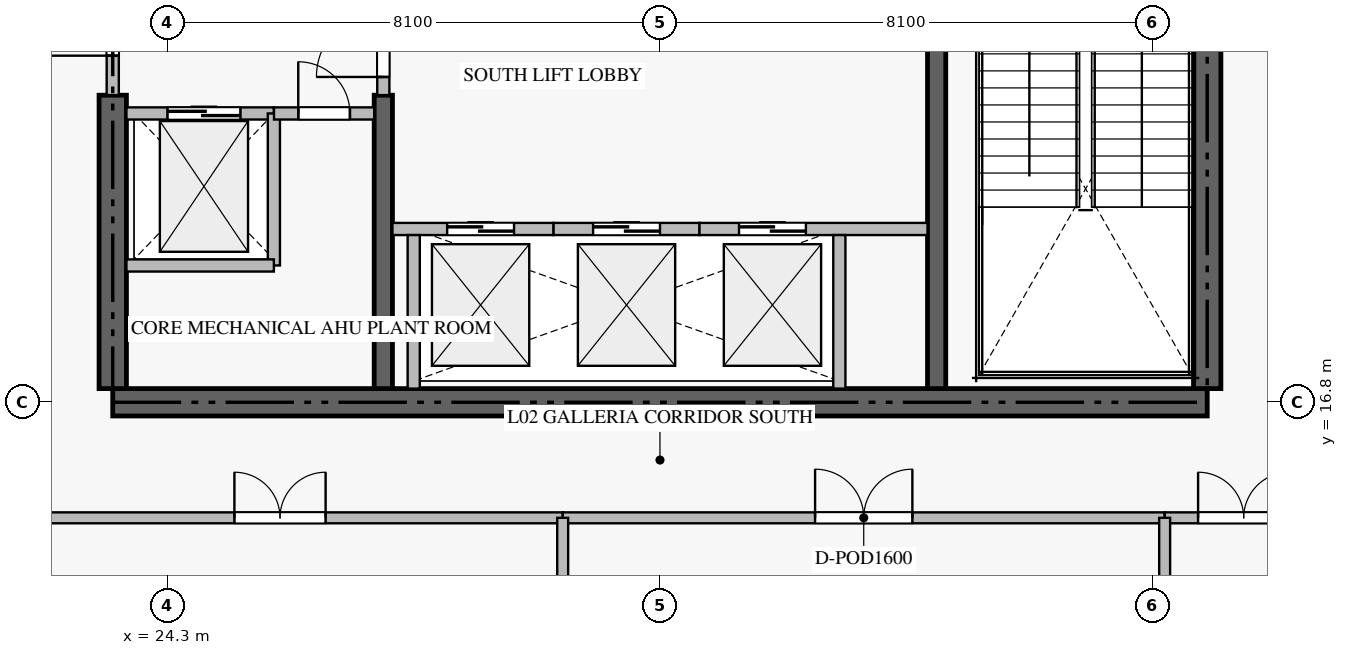
"""IFC4 building model, lengths in metres.
Left out: names, types, materials, properties, quantities, classifications, styles, units other than length and angle.
Written with IfcOpenShell. Run it as: python <this file> out.ifc"""

import sys

from ifc_helpers import new_model, si_unit, direction, frame, frame_2d, origin, place, context, subcontext, project, spatial, rectangle, extrude, source, transform, mapped, element, fill, save


model = new_model("IFC4")
c1 = context("Model", 3, precision=1e-05, world=origin(), true_north=direction((0.0, 1.0)))
c2 = subcontext(c1, "Body", "Model", "MODEL_VIEW")
j1 = project(units=[si_unit("LENGTHUNIT", "METRE"), si_unit("PLANEANGLEUNIT", "RADIAN")], contexts=[c1])
p1 = place(None, origin())
s1 = spatial("IfcSite", under=j1, at=p1, CompositionType="ELEMENT")
p2 = place(p1, origin())
s2 = spatial("IfcBuilding", under=s1, at=p2, CompositionType="ELEMENT")
p3 = place(p2, frame((0.0, 0.0, 10.5)))
s3 = spatial("IfcBuildingStorey", under=s2, at=p3, CompositionType="ELEMENT", Elevation=10.5)
p4 = place(p3, frame((23.4, 16.8, -0.38), z_axis=(0.0, 0.0, 1.0), x_axis=(1.0, 0.0, 0.0)))
e1 = element("IfcWall", 1, at=p4, inside=s3, PredefinedType="SHEAR", context=c2, shape_type="SweptSolid", body=[
    extrude(rectangle(XDim=18.0, YDim=0.45, at=frame_2d((9.0, 0.0))), origin(), (0.0, 0.0, 1.0), 4.798),
])
p5 = place(p3, frame((23.4, 17.025, -0.38), z_axis=(0.0, 0.0, 1.0), x_axis=(0.0, 1.0, 0.0)))
e2 = element("IfcWall", 2, at=p5, inside=s3, PredefinedType="SHEAR", context=c2, shape_type="SweptSolid", body=[
    extrude(rectangle(XDim=4.825, YDim=0.45, at=frame_2d((2.413, 0.0))), origin(), (0.0, 0.0, 1.0), 4.798),
])
p6 = place(p3, frame((41.4, 17.025, -0.38), z_axis=(0.0, 0.0, 1.0), x_axis=(0.0, 1.0, 0.0)))
e3 = element("IfcWall", 3, at=p6, inside=s3, PredefinedType="SHEAR", context=c2, shape_type="SweptSolid", body=[
    extrude(rectangle(XDim=8.325, YDim=0.45, at=frame_2d((4.163, 0.0))), origin(), (0.0, 0.0, 1.0), 4.798),
])
p7 = place(p3, frame((27.85, 17.025, -0.38), z_axis=(0.0, 0.0, 1.0), x_axis=(0.0, 1.0, 0.0)))
e4 = element("IfcWall", 4, at=p7, inside=s3, PredefinedType="SHEAR", context=c2, shape_type="SweptSolid", body=[
    extrude(rectangle(XDim=4.825, YDim=0.3, at=frame_2d((2.413, 0.0))), origin(), (0.0, 0.0, 1.0), 4.798),
])
p8 = place(p3, frame((36.95, 17.025, -0.38), z_axis=(0.0, 0.0, 1.0), x_axis=(0.0, 1.0, 0.0)))
e5 = element("IfcWall", 5, at=p8, inside=s3, PredefinedType="SHEAR", context=c2, shape_type="SweptSolid", body=[
    extrude(rectangle(XDim=8.325, YDim=0.3, at=frame_2d((4.163, 0.0))), origin(), (0.0, 0.0, 1.0), 4.798),
])
p9 = place(p3, frame((23.625, 21.55, 0.0), z_axis=(0.0, 0.0, 1.0), x_axis=(1.0, 0.0, 0.0)))
e6 = element("IfcWall", 6, at=p9, inside=s3, PredefinedType="STANDARD", context=c2, shape_type="SweptSolid", body=[
    extrude(rectangle(XDim=2.425, YDim=0.2, at=frame_2d((1.212, 0.0))), origin(), (0.0, 0.0, 1.0), 4.42),
])
p10 = place(p9, frame((0.675, 0.0, 0.0)))
e7 = element("IfcOpeningElement", 7, at=p10, cuts=e6, PredefinedType="OPENING", context=c2, shape_type="SweptSolid", body=[
    extrude(rectangle(XDim=1.2, YDim=2.2, at=frame_2d((0.6, 1.1))), frame((0.0, 0.11, 0.0), z_axis=(0.0, -1.0, 0.0), x_axis=(1.0, 0.0, 0.0)), (0.0, 0.0, 1.0), 0.22),
])
p11 = place(p3, frame((28.0, 19.65, 0.0), z_axis=(0.0, 0.0, 1.0), x_axis=(1.0, 0.0, 0.0)))
e8 = element("IfcWall", 8, at=p11, inside=s3, PredefinedType="STANDARD", context=c2, shape_type="SweptSolid", body=[
    extrude(rectangle(XDim=2.65, YDim=0.2, at=frame_2d((1.325, 0.0))), origin(), (0.0, 0.0, 1.0), 4.42),
])
p12 = place(p11, frame((0.9, 0.0, 0.0)))
e9 = element("IfcOpeningElement", 9, at=p12, cuts=e8, PredefinedType="OPENING", context=c2, shape_type="SweptSolid", body=[
    extrude(rectangle(XDim=1.1, YDim=2.2, at=frame_2d((0.55, 1.1))), frame((0.0, 0.11, 0.0), z_axis=(0.0, -1.0, 0.0), x_axis=(1.0, 0.0, 0.0)), (0.0, 0.0, 1.0), 0.22),
])
p13 = place(p3, frame((28.35, 17.025, 0.0), z_axis=(0.0, 0.0, 1.0), x_axis=(0.0, 1.0, 0.0)))
e10 = element("IfcWall", 10, at=p13, inside=s3, PredefinedType="STANDARD", context=c2, shape_type="SweptSolid", body=[
    extrude(rectangle(XDim=2.525, YDim=0.2, at=frame_2d((1.263, 0.0))), origin(), (0.0, 0.0, 1.0), 4.42),
])
p14 = place(p3, frame((30.65, 19.65, 0.0), z_axis=(0.0, 0.0, 1.0), x_axis=(1.0, 0.0, 0.0)))
e11 = element("IfcWall", 11, at=p14, inside=s3, PredefinedType="STANDARD", context=c2, shape_type="SweptSolid", body=[
    extrude(rectangle(XDim=2.4, YDim=0.2, at=frame_2d((1.2, 0.0))), origin(), (0.0, 0.0, 1.0), 4.42),
])
p15 = place(p14, frame((0.65, 0.0, 0.0)))
e12 = element("IfcOpeningElement", 12, at=p15, cuts=e11, PredefinedType="OPENING", context=c2, shape_type="SweptSolid", body=[
    extrude(rectangle(XDim=1.1, YDim=2.2, at=frame_2d((0.55, 1.1))), frame((0.0, 0.11, 0.0), z_axis=(0.0, -1.0, 0.0), x_axis=(1.0, 0.0, 0.0)), (0.0, 0.0, 1.0), 0.22),
])
p16 = place(p3, frame((33.05, 19.65, 0.0), z_axis=(0.0, 0.0, 1.0), x_axis=(1.0, 0.0, 0.0)))
e13 = element("IfcWall", 13, at=p16, inside=s3, PredefinedType="STANDARD", context=c2, shape_type="SweptSolid", body=[
    extrude(rectangle(XDim=3.75, YDim=0.2, at=frame_2d((1.875, 0.0))), origin(), (0.0, 0.0, 1.0), 4.42),
])
p17 = place(p16, frame((0.65, 0.0, 0.0)))
e14 = element("IfcOpeningElement", 14, at=p17, cuts=e13, PredefinedType="OPENING", context=c2, shape_type="SweptSolid", body=[
    extrude(rectangle(XDim=1.1, YDim=2.2, at=frame_2d((0.55, 1.1))), frame((0.0, 0.11, 0.0), z_axis=(0.0, -1.0, 0.0), x_axis=(1.0, 0.0, 0.0)), (0.0, 0.0, 1.0), 0.22),
])
p18 = place(p3, frame((35.35, 17.025, 0.0), z_axis=(0.0, 0.0, 1.0), x_axis=(0.0, 1.0, 0.0)))
e15 = element("IfcWall", 15, at=p18, inside=s3, PredefinedType="STANDARD", context=c2, shape_type="SweptSolid", body=[
    extrude(rectangle(XDim=2.525, YDim=0.2, at=frame_2d((1.263, 0.0))), origin(), (0.0, 0.0, 1.0), 4.42),
])
p19 = place(p3, frame((26.05, 19.05, 0.0), z_axis=(0.0, 0.0, 1.0), x_axis=(0.0, 1.0, 0.0)))
e16 = element("IfcWall", 16, at=p19, inside=s3, PredefinedType="STANDARD", context=c2, shape_type="SweptSolid", body=[
    extrude(rectangle(XDim=2.5, YDim=0.2, at=frame_2d((1.25, 0.0))), origin(), (0.0, 0.0, 1.0), 4.42),
])
p20 = place(p3, frame((23.625, 19.05, 0.0), z_axis=(0.0, 0.0, 1.0), x_axis=(1.0, 0.0, 0.0)))
e17 = element("IfcWall", 17, at=p20, inside=s3, PredefinedType="STANDARD", context=c2, shape_type="SweptSolid", body=[
    extrude(rectangle(XDim=2.425, YDim=0.2, at=frame_2d((1.212, 0.0))), origin(), (0.0, 0.0, 1.0), 4.42),
])
p21 = place(p3, frame((26.052, 21.55, 0.0), z_axis=(0.0, 0.0, 1.0), x_axis=(1.0, 0.0, 0.0)))
e18 = element("IfcWall", 18, at=p21, inside=s3, PredefinedType="STANDARD", context=c2, shape_type="SweptSolid", body=[
    extrude(rectangle(XDim=1.648, YDim=0.2, at=frame_2d((0.824, 0.0))), origin(), (0.0, 0.0, 1.0), 4.42),
])
p22 = place(p21, frame((0.399, 0.0, 0.0)))
e19 = element("IfcOpeningElement", 19, at=p22, cuts=e18, PredefinedType="OPENING", context=c2, shape_type="SweptSolid", body=[
    extrude(rectangle(XDim=0.85, YDim=2.1, at=frame_2d((0.425, 1.05))), frame((0.0, 0.11, 0.0), z_axis=(0.0, -1.0, 0.0), x_axis=(1.0, 0.0, 0.0)), (0.0, 0.0, 1.0), 0.22),
])
p23 = place(p3, frame((23.4, 21.852, 0.0), z_axis=(0.0, 0.0, 1.0), x_axis=(0.0, 1.0, 0.0)))
e20 = element("IfcWall", 20, at=p23, inside=s3, PredefinedType="STANDARD", context=c2, shape_type="SweptSolid", body=[
    extrude(rectangle(XDim=2.396, YDim=0.2, at=frame_2d((1.198, 0.0))), origin(), (0.0, 0.0, 1.0), 4.42),
])
p24 = place(p23, frame((0.648, 0.0, 0.0)))
e21 = element("IfcOpeningElement", 21, at=p24, cuts=e20, PredefinedType="OPENING", context=c2, shape_type="SweptSolid", body=[
    extrude(rectangle(XDim=1.1, YDim=2.15, at=frame_2d((0.55, 1.075))), frame((0.0, 0.11, 0.0), z_axis=(0.0, -1.0, 0.0), x_axis=(1.0, 0.0, 0.0)), (0.0, 0.0, 1.0), 0.22),
])
p25 = place(p3, frame((27.85, 21.852, 0.0), z_axis=(0.0, 0.0, 1.0), x_axis=(0.0, 1.0, 0.0)))
e22 = element("IfcWall", 22, at=p25, inside=s3, PredefinedType="STANDARD", context=c2, shape_type="SweptSolid", body=[
    extrude(rectangle(XDim=1.696, YDim=0.2, at=frame_2d((0.848, 0.0))), origin(), (0.0, 0.0, 1.0), 4.42),
])
p26 = place(p25, frame((0.298, 0.0, 0.0)))
e23 = element("IfcOpeningElement", 23, at=p26, cuts=e22, PredefinedType="OPENING", context=c2, shape_type="SweptSolid", body=[
    extrude(rectangle(XDim=1.1, YDim=2.15, at=frame_2d((0.55, 1.075))), frame((0.0, 0.11, 0.0), z_axis=(0.0, -1.0, 0.0), x_axis=(1.0, 0.0, 0.0)), (0.0, 0.0, 1.0), 0.22),
])
p27 = place(p3, frame((21.502, 14.9, 0.0), z_axis=(0.0, 0.0, 1.0), x_axis=(1.0, 0.0, 0.0)))
e24 = element("IfcWall", 24, at=p27, inside=s3, PredefinedType="PARTITIONING", context=c2, shape_type="SweptSolid", body=[
    extrude(rectangle(XDim=9.298, YDim=0.18, at=frame_2d((4.649, 0.0))), origin(), (0.0, 0.0, 1.0), 4.42),
])
p28 = place(p27, frame((3.899, 0.0, 0.0)))
e25 = element("IfcOpeningElement", 25, at=p28, cuts=e24, PredefinedType="OPENING", context=c2, shape_type="SweptSolid", body=[
    extrude(rectangle(XDim=1.5, YDim=2.25, at=frame_2d((0.75, 1.125))), frame((0.0, 0.1, 0.0), z_axis=(0.0, -1.0, 0.0), x_axis=(1.0, 0.0, 0.0)), (0.0, 0.0, 1.0), 0.2),
])
p29 = place(p3, frame((30.802, 14.9, 0.0), z_axis=(0.0, 0.0, 1.0), x_axis=(1.0, 0.0, 0.0)))
e26 = element("IfcWall", 26, at=p29, inside=s3, PredefinedType="PARTITIONING", context=c2, shape_type="SweptSolid", body=[
    extrude(rectangle(XDim=9.898, YDim=0.18, at=frame_2d((4.949, 0.0))), origin(), (0.0, 0.0, 1.0), 4.42),
])
p30 = place(p29, frame((4.149, 0.0, 0.0)))
e27 = element("IfcOpeningElement", 27, at=p30, cuts=e26, PredefinedType="OPENING", context=c2, shape_type="SweptSolid", body=[
    extrude(rectangle(XDim=1.6, YDim=2.3, at=frame_2d((0.8, 1.15))), frame((0.0, 0.1, 0.0), z_axis=(0.0, -1.0, 0.0), x_axis=(1.0, 0.0, 0.0)), (0.0, 0.0, 1.0), 0.2),
])
p31 = place(p3, frame((40.702, 14.9, 0.0), z_axis=(0.0, 0.0, 1.0), x_axis=(1.0, 0.0, 0.0)))
e28 = element("IfcWall", 28, at=p31, inside=s3, PredefinedType="PARTITIONING", context=c2, shape_type="SweptSolid", body=[
    extrude(rectangle(XDim=2.596, YDim=0.18, at=frame_2d((1.298, 0.0))), origin(), (0.0, 0.0, 1.0), 4.42),
])
p32 = place(p31, frame((0.548, 0.0, 0.0)))
e29 = element("IfcOpeningElement", 29, at=p32, cuts=e28, PredefinedType="OPENING", context=c2, shape_type="SweptSolid", body=[
    extrude(rectangle(XDim=1.5, YDim=2.25, at=frame_2d((0.75, 1.125))), frame((0.0, 0.1, 0.0), z_axis=(0.0, -1.0, 0.0), x_axis=(1.0, 0.0, 0.0)), (0.0, 0.0, 1.0), 0.2),
])
p33 = place(p3, frame((30.8, 2.482, 0.0), z_axis=(0.0, 0.0, 1.0), x_axis=(0.0, 1.0, 0.0)))
e30 = element("IfcWall", 30, at=p33, inside=s3, PredefinedType="PARTITIONING", context=c2, shape_type="SweptSolid", body=[
    extrude(rectangle(XDim=12.418, YDim=0.18, at=frame_2d((6.209, 0.0))), origin(), (0.0, 0.0, 1.0), 4.42),
])
p34 = place(p3, frame((40.7, 4.282, 0.0), z_axis=(0.0, 0.0, 1.0), x_axis=(0.0, 1.0, 0.0)))
e31 = element("IfcWall", 31, at=p34, inside=s3, PredefinedType="PARTITIONING", context=c2, shape_type="SweptSolid", body=[
    extrude(rectangle(XDim=10.618, YDim=0.18, at=frame_2d((5.309, 0.0))), origin(), (0.0, 0.0, 1.0), 4.42),
])
m1 = source(origin(), c2, "Body", "SweptSolid", [
    extrude(rectangle(XDim=1.2, YDim=2.2, at=frame_2d((0.6, 1.1))), frame((0.0, 0.025, 0.0), z_axis=(0.0, -1.0, 0.0), x_axis=(1.0, 0.0, 0.0)), (0.0, 0.0, 1.0), 0.05),
])
p35 = place(p10, origin())
e32 = element("IfcDoor", 32, at=p35, inside=s3, OperationType="DOUBLE_DOOR_SLIDING", PredefinedType="DOOR", context=c2, shape_type="MappedRepresentation", body=[
    mapped(m1, transform((0.0, 0.0, 0.0), scale=1.0)),
])
fill(e7, e32)
m2 = source(origin(), c2, "Body", "SweptSolid", [
    extrude(rectangle(XDim=1.1, YDim=2.2, at=frame_2d((0.55, 1.1))), frame((0.0, 0.025, 0.0), z_axis=(0.0, -1.0, 0.0), x_axis=(1.0, 0.0, 0.0)), (0.0, 0.0, 1.0), 0.05),
])
p36 = place(p12, origin())
e33 = element("IfcDoor", 33, at=p36, inside=s3, OperationType="DOUBLE_DOOR_SLIDING", PredefinedType="DOOR", context=c2, shape_type="MappedRepresentation", body=[
    mapped(m2, transform((0.0, 0.0, 0.0), scale=1.0)),
])
fill(e9, e33)
p37 = place(p15, origin())
e34 = element("IfcDoor", 34, at=p37, inside=s3, OperationType="DOUBLE_DOOR_SLIDING", PredefinedType="DOOR", context=c2, shape_type="MappedRepresentation", body=[
    mapped(m2, transform((0.0, 0.0, 0.0), scale=1.0)),
])
fill(e12, e34)
p38 = place(p17, origin())
e35 = element("IfcDoor", 35, at=p38, inside=s3, OperationType="DOUBLE_DOOR_SLIDING", PredefinedType="DOOR", context=c2, shape_type="MappedRepresentation", body=[
    mapped(m2, transform((0.0, 0.0, 0.0), scale=1.0)),
])
fill(e14, e35)
m3 = source(origin(), c2, "Body", "SweptSolid", [
    extrude(rectangle(XDim=0.85, YDim=2.1, at=frame_2d((0.425, 1.05))), frame((0.0, 0.025, 0.0), z_axis=(0.0, -1.0, 0.0), x_axis=(1.0, 0.0, 0.0)), (0.0, 0.0, 1.0), 0.05),
])
p39 = place(p22, origin())
e36 = element("IfcDoor", 36, at=p39, inside=s3, OperationType="SINGLE_SWING_LEFT", PredefinedType="DOOR", context=c2, shape_type="MappedRepresentation", body=[
    mapped(m3, transform((0.0, 0.0, 0.0), scale=1.0)),
])
fill(e19, e36)
m4 = source(origin(), c2, "Body", "SweptSolid", [
    extrude(rectangle(XDim=1.1, YDim=2.15, at=frame_2d((0.55, 1.075))), frame((0.0, 0.025, 0.0), z_axis=(0.0, -1.0, 0.0), x_axis=(1.0, 0.0, 0.0)), (0.0, 0.0, 1.0), 0.05),
])
p40 = place(p24, origin())
e37 = element("IfcDoor", 37, at=p40, inside=s3, OperationType="SINGLE_SWING_LEFT", PredefinedType="DOOR", context=c2, shape_type="MappedRepresentation", body=[
    mapped(m4, transform((0.0, 0.0, 0.0), scale=1.0)),
])
fill(e21, e37)
p41 = place(p26, origin())
e38 = element("IfcDoor", 38, at=p41, inside=s3, OperationType="SINGLE_SWING_LEFT", PredefinedType="DOOR", context=c2, shape_type="MappedRepresentation", body=[
    mapped(m4, transform((0.0, 0.0, 0.0), scale=1.0)),
])
fill(e23, e38)
m5 = source(origin(), c2, "Body", "SweptSolid", [
    extrude(rectangle(XDim=1.5, YDim=2.25, at=frame_2d((0.75, 1.125))), frame((0.0, 0.025, 0.0), z_axis=(0.0, -1.0, 0.0), x_axis=(1.0, 0.0, 0.0)), (0.0, 0.0, 1.0), 0.05),
])
p42 = place(p28, origin())
e39 = element("IfcDoor", 39, at=p42, inside=s3, OperationType="DOUBLE_DOOR_SINGLE_SWING", PredefinedType="DOOR", context=c2, shape_type="MappedRepresentation", body=[
    mapped(m5, transform((0.0, 0.0, 0.0), scale=1.0)),
])
fill(e25, e39)
m6 = source(origin(), c2, "Body", "SweptSolid", [
    extrude(rectangle(XDim=1.6, YDim=2.3, at=frame_2d((0.8, 1.15))), frame((0.0, 0.025, 0.0), z_axis=(0.0, -1.0, 0.0), x_axis=(1.0, 0.0, 0.0)), (0.0, 0.0, 1.0), 0.05),
])
p43 = place(p30, origin())
e40 = element("IfcDoor", 40, at=p43, inside=s3, OperationType="DOUBLE_DOOR_SINGLE_SWING", PredefinedType="DOOR", context=c2, shape_type="MappedRepresentation", body=[
    mapped(m6, transform((0.0, 0.0, 0.0), scale=1.0)),
])
fill(e27, e40)
p44 = place(p32, origin())
e41 = element("IfcDoor", 41, at=p44, inside=s3, OperationType="DOUBLE_DOOR_SINGLE_SWING", PredefinedType="DOOR", context=c2, shape_type="MappedRepresentation", body=[
    mapped(m5, transform((0.0, 0.0, 0.0), scale=1.0)),
])
fill(e29, e41)
save(model, sys.argv[1])
